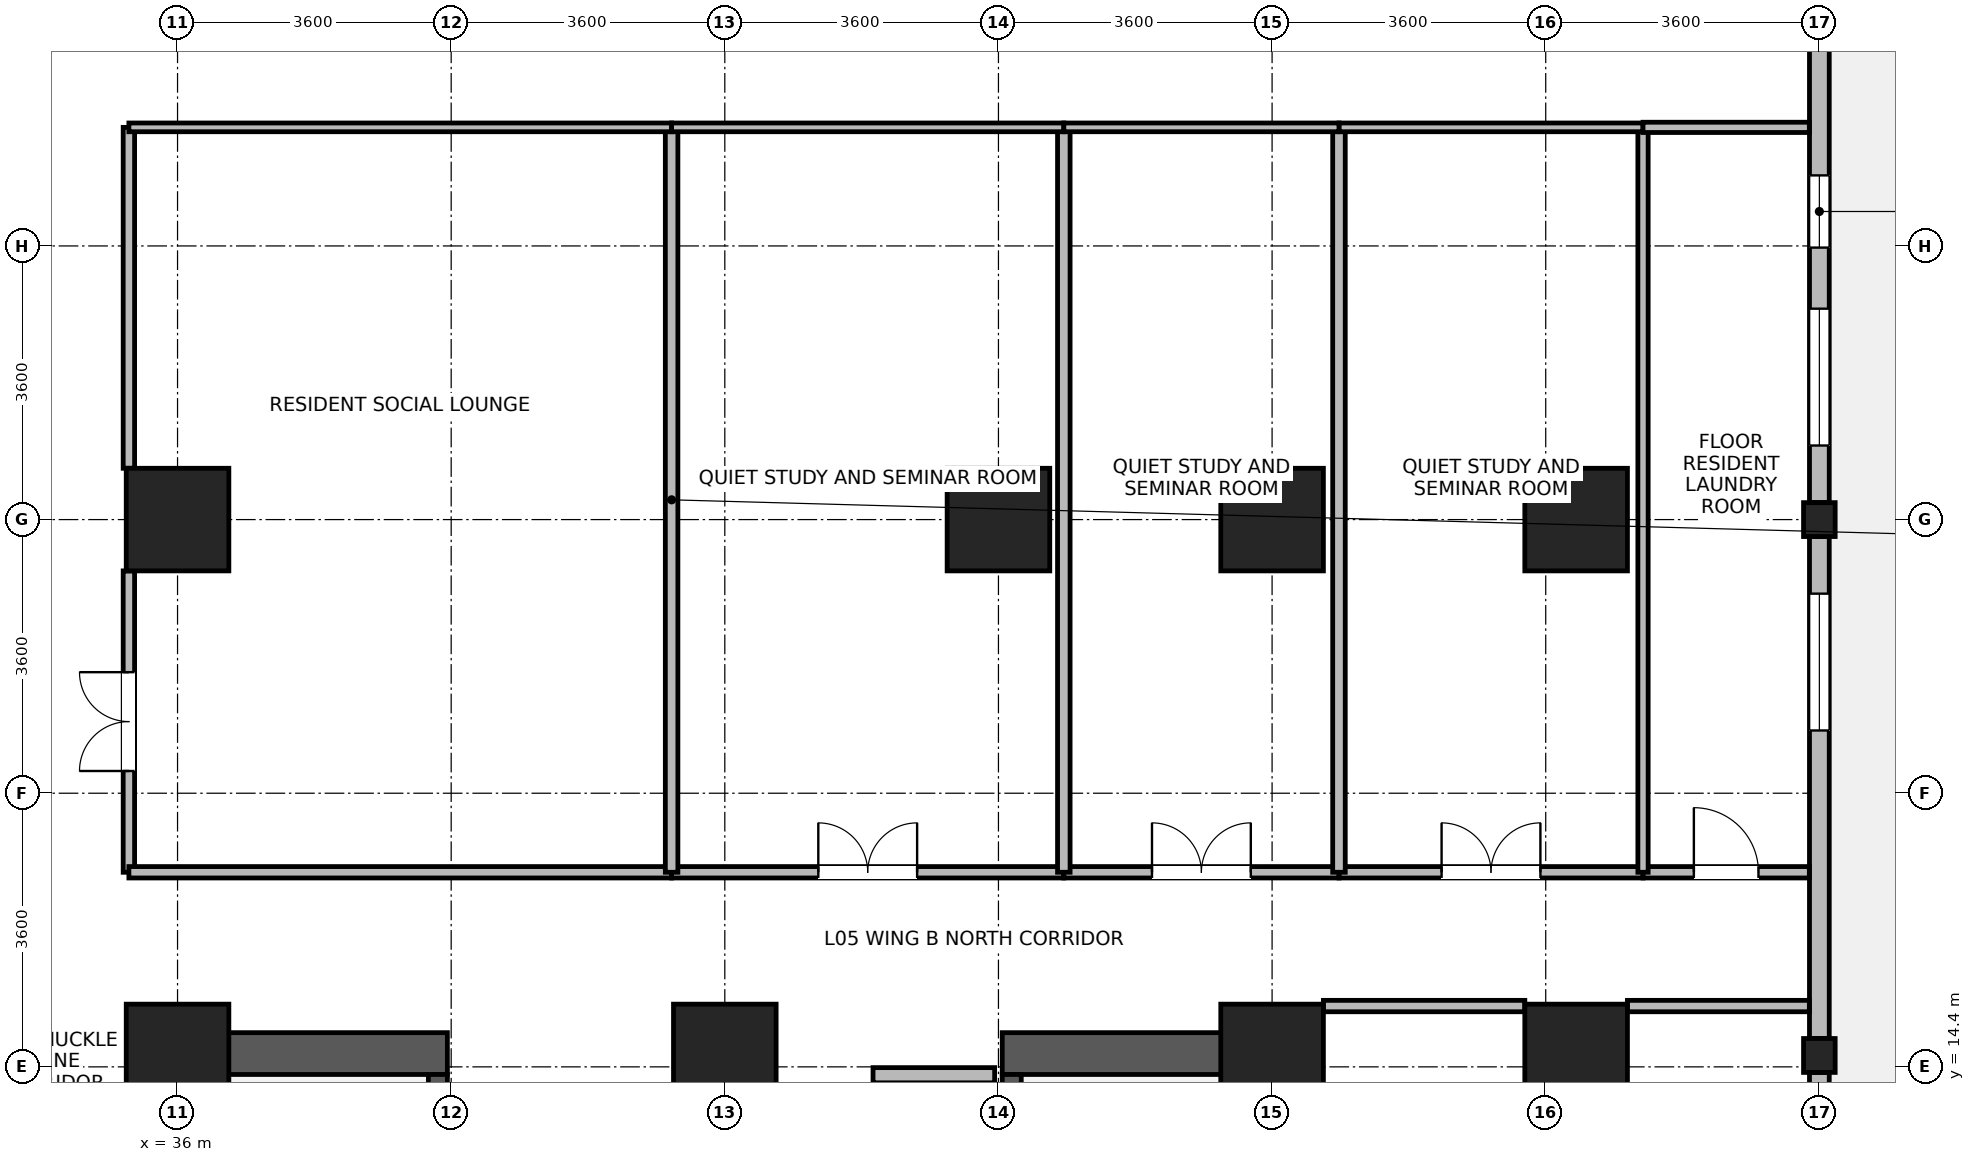
"""IFC4 building model, lengths in metres.
Left out: names, types, materials, properties, quantities, classifications, styles, units other than length and angle.
Written with IfcOpenShell. Run it as: python <this file> out.ifc"""

import sys

from ifc_helpers import new_model, si_unit, direction, frame, frame_2d, origin, origin_2d, place, context, subcontext, project, spatial, rectangle, i_section, extrude, source, transform, mapped, element, fill, save


model = new_model("IFC4")
c1 = context("Model", 3, precision=1e-05, world=origin(), true_north=direction((0.0, 1.0)))
c2 = subcontext(c1, "Body", "Model", "MODEL_VIEW")
j1 = project(units=[si_unit("LENGTHUNIT", "METRE"), si_unit("PLANEANGLEUNIT", "RADIAN")], contexts=[c1])
p1 = place(None, origin())
s1 = spatial("IfcSite", under=j1, at=p1, CompositionType="ELEMENT")
p2 = place(p1, origin())
s2 = spatial("IfcBuilding", under=s1, at=p2, CompositionType="ELEMENT")
p3 = place(p2, frame((0.0, 0.0, 25.3)))
s3 = spatial("IfcBuildingStorey", under=s2, at=p3, CompositionType="ELEMENT", Elevation=25.3)
for number, where, z_axis, x_axis in (
    (1, (36.075, 6.75, 0.0), (0.0, 0.0, 1.0), (0.0, 1.0, 0.0)),
    (2, (50.325, 6.75, 0.0), (0.0, 0.0, 1.0), (0.0, 1.0, 0.0)),
):
    element("IfcWall", number, at=place(p3, frame(where, z_axis=z_axis, x_axis=x_axis)), inside=s3, PredefinedType="SHEAR", context=c2, shape_type="SweptSolid", body=[
        extrude(rectangle(XDim=8.1, YDim=0.55, at=frame_2d((4.05, 0.0))), origin(), (0.0, 0.0, 1.0), 3.45),
    ])
for number, where, z_axis, x_axis in (
    (3, (36.35, 14.575, 0.0), (0.0, 0.0, 1.0), (1.0, 0.0, 0.0)),
    (4, (46.85, 14.575, 0.0), (0.0, 0.0, 1.0), (1.0, 0.0, 0.0)),
):
    element("IfcWall", number, at=place(p3, frame(where, z_axis=z_axis, x_axis=x_axis)), inside=s3, PredefinedType="SHEAR", context=c2, shape_type="SweptSolid", body=[
        extrude(rectangle(XDim=3.2, YDim=0.55, at=frame_2d((1.6, 0.0))), origin(), (0.0, 0.0, 1.0), 3.45),
    ])
p4 = place(p3, frame((39.425, 7.3, 0.0), z_axis=(0.0, 0.0, 1.0), x_axis=(0.0, 1.0, 0.0)))
e5 = element("IfcWall", 5, at=p4, inside=s3, PredefinedType="SHEAR", context=c2, shape_type="SweptSolid", body=[
    extrude(rectangle(XDim=7.0, YDim=0.25, at=frame_2d((3.5, 0.0))), origin(), (0.0, 0.0, 1.0), 3.45),
])
p5 = place(p4, frame((0.15, 0.0, 0.0)))
e6 = element("IfcOpeningElement", 6, at=p5, cuts=e5, PredefinedType="OPENING", context=c2, shape_type="SweptSolid", body=[
    extrude(rectangle(XDim=1.1, YDim=2.08, at=frame_2d((0.55, 1.04))), frame((0.0, 0.135, 0.0), z_axis=(0.0, -1.0, 0.0), x_axis=(1.0, 0.0, 0.0)), (0.0, 0.0, 1.0), 0.27),
])
p6 = place(p3, frame((46.975, 7.3, 0.0), z_axis=(0.0, 0.0, 1.0), x_axis=(0.0, 1.0, 0.0)))
e7 = element("IfcWall", 7, at=p6, inside=s3, PredefinedType="SHEAR", context=c2, shape_type="SweptSolid", body=[
    extrude(rectangle(XDim=7.0, YDim=0.25, at=frame_2d((3.5, 0.0))), origin(), (0.0, 0.0, 1.0), 3.45),
])
p7 = place(p6, frame((0.15, 0.0, 0.0)))
e8 = element("IfcOpeningElement", 8, at=p7, cuts=e7, PredefinedType="OPENING", context=c2, shape_type="SweptSolid", body=[
    extrude(rectangle(XDim=1.1, YDim=2.08, at=frame_2d((0.55, 1.04))), frame((0.0, 0.135, 0.0), z_axis=(0.0, -1.0, 0.0), x_axis=(1.0, 0.0, 0.0)), (0.0, 0.0, 1.0), 0.27),
])
m1 = source(origin(), c2, "Body", "SweptSolid", [
    extrude(rectangle(XDim=1.35, YDim=1.35, at=origin_2d()), origin(), (0.0, 0.0, 1.0), 3.7),
])
for number, where, z_axis, x_axis in (
    (9, (36.0, 21.6, 0.0), (0.0, 0.0, 1.0), (1.0, 0.0, 0.0)),
    (10, (46.8, 21.6, 0.0), (0.0, 0.0, 1.0), (1.0, 0.0, 0.0)),
    (11, (36.0, 14.55, 0.0), (0.0, 0.0, 1.0), (1.0, 0.0, 0.0)),
    (12, (43.2, 14.55, 0.0), (0.0, 0.0, 1.0), (1.0, 0.0, 0.0)),
    (13, (50.4, 14.55, 0.0), (0.0, 0.0, 1.0), (1.0, 0.0, 0.0)),
    (14, (50.4, 21.6, 0.0), (0.0, 0.0, 1.0), (1.0, 0.0, 0.0)),
    (15, (54.4, 14.55, 0.0), (0.0, 0.0, 1.0), (1.0, 0.0, 0.0)),
    (16, (54.4, 21.6, 0.0), (0.0, 0.0, 1.0), (1.0, 0.0, 0.0)),
):
    element("IfcColumn", number, at=place(p3, frame(where, z_axis=z_axis, x_axis=x_axis)), inside=s3, PredefinedType="COLUMN", context=c2, shape_type="MappedRepresentation", body=[
        mapped(m1, transform((0.0, 0.0, 0.0), x_axis=(1.0, 0.0, 0.0), y_axis=(0.0, 1.0, 0.0), z_axis=(0.0, 0.0, 1.0), scale=1.0)),
    ])
m2 = source(origin(), c2, "Body", "SweptSolid", [
    extrude(i_section(OverallWidth=0.416, OverallDepth=0.446, WebThickness=0.029, FlangeThickness=0.04, FilletRadius=0.015, at=origin_2d()), origin(), (0.0, 0.0, 1.0), 3.7),
])
for number, where, z_axis, x_axis in (
    (17, (57.6, 14.55, 0.0), (0.0, 0.0, 1.0), (1.0, 0.0, 0.0)),
    (18, (57.6, 21.6, 0.0), (0.0, 0.0, 1.0), (1.0, 0.0, 0.0)),
):
    element("IfcColumn", number, at=place(p3, frame(where, z_axis=z_axis, x_axis=x_axis)), inside=s3, PredefinedType="COLUMN", context=c2, shape_type="MappedRepresentation", body=[
        mapped(m2, transform((0.0, 0.0, 0.0), x_axis=(1.0, 0.0, 0.0), y_axis=(0.0, 1.0, 0.0), z_axis=(0.0, 0.0, 1.0), scale=1.0)),
    ])
p8 = place(p3, frame((57.6, 14.326, 0.0), z_axis=(0.0, 0.0, 1.0), x_axis=(0.0, -1.0, 0.0)))
e19 = element("IfcWall", 19, at=p8, inside=s3, PredefinedType="STANDARD", context=c2, shape_type="SweptSolid", body=[
    extrude(rectangle(XDim=7.052, YDim=0.26, at=frame_2d((3.526, 0.0))), origin(), (0.0, 0.0, 1.0), 2.93),
])
p9 = place(p8, frame((0.863, 0.0, 0.85)))
e20 = element("IfcOpeningElement", 20, at=p9, cuts=e19, PredefinedType="OPENING", context=c2, shape_type="SweptSolid", body=[
    extrude(rectangle(XDim=1.8, YDim=1.85, at=frame_2d((0.9, 0.925))), frame((0.0, 0.14, 0.0), z_axis=(0.0, -1.0, 0.0), x_axis=(1.0, 0.0, 0.0)), (0.0, 0.0, 1.0), 0.28),
])
p10 = place(p8, frame((4.389, 0.0, 0.85)))
e21 = element("IfcOpeningElement", 21, at=p10, cuts=e19, PredefinedType="OPENING", context=c2, shape_type="SweptSolid", body=[
    extrude(rectangle(XDim=1.8, YDim=1.85, at=frame_2d((0.9, 0.925))), frame((0.0, 0.14, 0.0), z_axis=(0.0, -1.0, 0.0), x_axis=(1.0, 0.0, 0.0)), (0.0, 0.0, 1.0), 0.28),
])
p11 = place(p3, frame((57.6, 21.376, 0.0), z_axis=(0.0, 0.0, 1.0), x_axis=(0.0, -1.0, 0.0)))
e22 = element("IfcWall", 22, at=p11, inside=s3, PredefinedType="STANDARD", context=c2, shape_type="SweptSolid", body=[
    extrude(rectangle(XDim=6.602, YDim=0.26, at=frame_2d((3.301, 0.0))), origin(), (0.0, 0.0, 1.0), 2.93),
])
p12 = place(p11, frame((0.75, 0.0, 0.85)))
e23 = element("IfcOpeningElement", 23, at=p12, cuts=e22, PredefinedType="OPENING", context=c2, shape_type="SweptSolid", body=[
    extrude(rectangle(XDim=1.8, YDim=1.85, at=frame_2d((0.9, 0.925))), frame((0.0, 0.14, 0.0), z_axis=(0.0, -1.0, 0.0), x_axis=(1.0, 0.0, 0.0)), (0.0, 0.0, 1.0), 0.28),
])
p13 = place(p3, frame((57.6, 28.426, 0.0), z_axis=(0.0, 0.0, 1.0), x_axis=(0.0, -1.0, 0.0)))
e24 = element("IfcWall", 24, at=p13, inside=s3, PredefinedType="STANDARD", context=c2, shape_type="SweptSolid", body=[
    extrude(rectangle(XDim=6.602, YDim=0.26, at=frame_2d((3.301, 0.0))), origin(), (0.0, 0.0, 1.0), 2.93),
])
p14 = place(p13, frame((4.052, 0.0, 0.85)))
e25 = element("IfcOpeningElement", 25, at=p14, cuts=e24, PredefinedType="OPENING", context=c2, shape_type="SweptSolid", body=[
    extrude(rectangle(XDim=1.8, YDim=1.85, at=frame_2d((0.9, 0.925))), frame((0.0, 0.14, 0.0), z_axis=(0.0, -1.0, 0.0), x_axis=(1.0, 0.0, 0.0)), (0.0, 0.0, 1.0), 0.28),
])
p15 = place(p13, frame((2.298, 0.0, 0.85)))
e26 = element("IfcOpeningElement", 26, at=p15, cuts=e24, PredefinedType="OPENING", context=c2, shape_type="SweptSolid", body=[
    extrude(rectangle(XDim=0.95, YDim=1.75, at=frame_2d((0.475, 0.875))), frame((0.0, 0.14, 0.0), z_axis=(0.0, -1.0, 0.0), x_axis=(1.0, 0.0, 0.0)), (0.0, 0.0, 1.0), 0.28),
])
p16 = place(p3, frame((45.15, 14.29, 0.0), z_axis=(0.0, 0.0, 1.0), x_axis=(1.0, 0.0, 0.0)))
e27 = element("IfcWall", 27, at=p16, inside=s3, PredefinedType="PARTITIONING", context=c2, shape_type="SweptSolid", body=[
    extrude(rectangle(XDim=1.6, YDim=0.2, at=frame_2d((0.8, 0.0))), origin(), (0.0, 0.0, 1.0), 2.23),
])
p17 = place(p3, frame((35.36, 16.96, 0.0), z_axis=(0.0, 0.0, 1.0), x_axis=(0.0, 1.0, 0.0)))
e28 = element("IfcWall", 28, at=p17, inside=s3, PredefinedType="PARTITIONING", context=c2, shape_type="SweptSolid", body=[
    extrude(rectangle(XDim=3.965, YDim=0.15, at=frame_2d((1.982, 0.0))), origin(), (0.0, 0.0, 1.0), 3.43),
])
p18 = place(p17, frame((1.333, 0.0, 0.0)))
e29 = element("IfcOpeningElement", 29, at=p18, cuts=e28, PredefinedType="OPENING", context=c2, shape_type="SweptSolid", body=[
    extrude(rectangle(XDim=1.3, YDim=2.12, at=frame_2d((0.65, 1.06))), frame((0.0, 0.085, 0.0), z_axis=(0.0, -1.0, 0.0), x_axis=(1.0, 0.0, 0.0)), (0.0, 0.0, 1.0), 0.17),
])
p19 = place(p3, frame((35.36, 22.275, 0.0), z_axis=(0.0, 0.0, 1.0), x_axis=(0.0, 1.0, 0.0)))
e30 = element("IfcWall", 30, at=p19, inside=s3, PredefinedType="PARTITIONING", context=c2, shape_type="SweptSolid", body=[
    extrude(rectangle(XDim=4.485, YDim=0.15, at=frame_2d((2.243, 0.0))), origin(), (0.0, 0.0, 1.0), 3.43),
])
p20 = place(p3, frame((35.36, 16.96, 0.0), z_axis=(0.0, 0.0, 1.0), x_axis=(1.0, 0.0, 0.0)))
e31 = element("IfcWall", 31, at=p20, inside=s3, PredefinedType="PARTITIONING", context=c2, shape_type="SweptSolid", body=[
    extrude(rectangle(XDim=7.14, YDim=0.15, at=frame_2d((3.57, 0.0))), origin(), (0.0, 0.0, 1.0), 3.43),
])
p21 = place(p3, frame((51.075, 15.2, 0.0), z_axis=(0.0, 0.0, 1.0), x_axis=(1.0, 0.0, 0.0)))
e32 = element("IfcWall", 32, at=p21, inside=s3, PredefinedType="PARTITIONING", context=c2, shape_type="SweptSolid", body=[
    extrude(rectangle(XDim=2.65, YDim=0.15, at=frame_2d((1.325, 0.0))), origin(), (0.0, 0.0, 1.0), 3.43),
])
p22 = place(p3, frame((55.075, 15.2, 0.0), z_axis=(0.0, 0.0, 1.0), x_axis=(1.0, 0.0, 0.0)))
e33 = element("IfcWall", 33, at=p22, inside=s3, PredefinedType="PARTITIONING", context=c2, shape_type="SweptSolid", body=[
    extrude(rectangle(XDim=2.393, YDim=0.15, at=frame_2d((1.197, 0.0))), origin(), (0.0, 0.0, 1.0), 3.43),
])
p23 = place(p3, frame((42.5, 16.96, 0.0), z_axis=(0.0, 0.0, 1.0), x_axis=(1.0, 0.0, 0.0)))
e34 = element("IfcWall", 34, at=p23, inside=s3, PredefinedType="PARTITIONING", context=c2, shape_type="SweptSolid", body=[
    extrude(rectangle(XDim=5.16, YDim=0.15, at=frame_2d((2.58, 0.0))), origin(), (0.0, 0.0, 1.0), 3.43),
])
p24 = place(p23, frame((1.93, 0.0, 0.0)))
e35 = element("IfcOpeningElement", 35, at=p24, cuts=e34, PredefinedType="OPENING", context=c2, shape_type="SweptSolid", body=[
    extrude(rectangle(XDim=1.3, YDim=2.12, at=frame_2d((0.65, 1.06))), frame((0.0, 0.085, 0.0), z_axis=(0.0, -1.0, 0.0), x_axis=(1.0, 0.0, 0.0)), (0.0, 0.0, 1.0), 0.17),
])
p25 = place(p3, frame((51.28, 16.96, 0.0), z_axis=(0.0, 0.0, 1.0), x_axis=(1.0, 0.0, 0.0)))
e36 = element("IfcWall", 36, at=p25, inside=s3, PredefinedType="PARTITIONING", context=c2, shape_type="SweptSolid", body=[
    extrude(rectangle(XDim=4.0, YDim=0.15, at=frame_2d((2.0, 0.0))), origin(), (0.0, 0.0, 1.0), 3.43),
])
p26 = place(p25, frame((1.35, 0.0, 0.0)))
e37 = element("IfcOpeningElement", 37, at=p26, cuts=e36, PredefinedType="OPENING", context=c2, shape_type="SweptSolid", body=[
    extrude(rectangle(XDim=1.3, YDim=2.12, at=frame_2d((0.65, 1.06))), frame((0.0, 0.085, 0.0), z_axis=(0.0, -1.0, 0.0), x_axis=(1.0, 0.0, 0.0)), (0.0, 0.0, 1.0), 0.17),
])
p27 = place(p3, frame((47.66, 16.96, 0.0), z_axis=(0.0, 0.0, 1.0), x_axis=(1.0, 0.0, 0.0)))
e38 = element("IfcWall", 38, at=p27, inside=s3, PredefinedType="PARTITIONING", context=c2, shape_type="SweptSolid", body=[
    extrude(rectangle(XDim=3.62, YDim=0.15, at=frame_2d((1.81, 0.0))), origin(), (0.0, 0.0, 1.0), 3.43),
])
p28 = place(p27, frame((1.16, 0.0, 0.0)))
e39 = element("IfcOpeningElement", 39, at=p28, cuts=e38, PredefinedType="OPENING", context=c2, shape_type="SweptSolid", body=[
    extrude(rectangle(XDim=1.3, YDim=2.12, at=frame_2d((0.65, 1.06))), frame((0.0, 0.085, 0.0), z_axis=(0.0, -1.0, 0.0), x_axis=(1.0, 0.0, 0.0)), (0.0, 0.0, 1.0), 0.17),
])
p29 = place(p3, frame((55.28, 16.96, 0.0), z_axis=(0.0, 0.0, 1.0), x_axis=(1.0, 0.0, 0.0)))
e40 = element("IfcWall", 40, at=p29, inside=s3, PredefinedType="PARTITIONING", context=c2, shape_type="SweptSolid", body=[
    extrude(rectangle(XDim=2.188, YDim=0.15, at=frame_2d((1.094, 0.0))), origin(), (0.0, 0.0, 1.0), 3.43),
])
p30 = place(p29, frame((0.669, 0.0, 0.0)))
e41 = element("IfcOpeningElement", 41, at=p30, cuts=e40, PredefinedType="OPENING", context=c2, shape_type="SweptSolid", body=[
    extrude(rectangle(XDim=0.85, YDim=2.04, at=frame_2d((0.425, 1.02))), frame((0.0, 0.085, 0.0), z_axis=(0.0, -1.0, 0.0), x_axis=(1.0, 0.0, 0.0)), (0.0, 0.0, 1.0), 0.17),
])
for number, where, z_axis, x_axis in (
    (42, (42.5, 16.96, 0.0), (0.0, 0.0, 1.0), (0.0, 1.0, 0.0)),
    (43, (47.66, 16.96, 0.0), (0.0, 0.0, 1.0), (0.0, 1.0, 0.0)),
    (44, (51.28, 16.96, 0.0), (0.0, 0.0, 1.0), (0.0, 1.0, 0.0)),
):
    element("IfcWall", number, at=place(p3, frame(where, z_axis=z_axis, x_axis=x_axis)), inside=s3, PredefinedType="PARTITIONING", context=c2, shape_type="SweptSolid", body=[
        extrude(rectangle(XDim=9.8, YDim=0.165, at=frame_2d((4.9, 0.0))), origin(), (0.0, 0.0, 1.0), 3.43),
    ])
p31 = place(p3, frame((55.28, 16.96, 0.0), z_axis=(0.0, 0.0, 1.0), x_axis=(0.0, 1.0, 0.0)))
e45 = element("IfcWall", 45, at=p31, inside=s3, PredefinedType="PARTITIONING", context=c2, shape_type="SweptSolid", body=[
    extrude(rectangle(XDim=9.8, YDim=0.135, at=frame_2d((4.9, 0.0))), origin(), (0.0, 0.0, 1.0), 3.43),
])
p32 = place(p3, frame((35.36, 26.76, 0.0), z_axis=(0.0, 0.0, 1.0), x_axis=(1.0, 0.0, 0.0)))
e46 = element("IfcWall", 46, at=p32, inside=s3, PredefinedType="PARTITIONING", context=c2, shape_type="SweptSolid", body=[
    extrude(rectangle(XDim=7.14, YDim=0.115, at=frame_2d((3.57, 0.0))), origin(), (0.0, 0.0, 1.0), 3.43),
])
p33 = place(p3, frame((42.5, 26.76, 0.0), z_axis=(0.0, 0.0, 1.0), x_axis=(1.0, 0.0, 0.0)))
e47 = element("IfcWall", 47, at=p33, inside=s3, PredefinedType="PARTITIONING", context=c2, shape_type="SweptSolid", body=[
    extrude(rectangle(XDim=5.16, YDim=0.115, at=frame_2d((2.58, 0.0))), origin(), (0.0, 0.0, 1.0), 3.43),
])
p34 = place(p3, frame((51.28, 26.76, 0.0), z_axis=(0.0, 0.0, 1.0), x_axis=(1.0, 0.0, 0.0)))
e48 = element("IfcWall", 48, at=p34, inside=s3, PredefinedType="PARTITIONING", context=c2, shape_type="SweptSolid", body=[
    extrude(rectangle(XDim=4.0, YDim=0.115, at=frame_2d((2.0, 0.0))), origin(), (0.0, 0.0, 1.0), 3.43),
])
p35 = place(p3, frame((47.66, 26.76, 0.0), z_axis=(0.0, 0.0, 1.0), x_axis=(1.0, 0.0, 0.0)))
e49 = element("IfcWall", 49, at=p35, inside=s3, PredefinedType="PARTITIONING", context=c2, shape_type="SweptSolid", body=[
    extrude(rectangle(XDim=3.62, YDim=0.115, at=frame_2d((1.81, 0.0))), origin(), (0.0, 0.0, 1.0), 3.43),
])
p36 = place(p3, frame((55.28, 26.76, 0.0), z_axis=(0.0, 0.0, 1.0), x_axis=(1.0, 0.0, 0.0)))
e50 = element("IfcWall", 50, at=p36, inside=s3, PredefinedType="PARTITIONING", context=c2, shape_type="SweptSolid", body=[
    extrude(rectangle(XDim=2.188, YDim=0.135, at=frame_2d((1.094, 0.0))), origin(), (0.0, 0.0, 1.0), 3.43),
])
p37 = place(p12, origin())
e51 = element("IfcWindow", 51, at=p37, inside=s3, PartitioningType="SINGLE_PANEL", PredefinedType="WINDOW", context=c2, shape_type="SweptSolid", body=[
    extrude(rectangle(XDim=1.8, YDim=1.85, at=frame_2d((0.9, 0.925))), frame((0.0, 0.03, 0.0), z_axis=(0.0, -1.0, 0.0), x_axis=(1.0, 0.0, 0.0)), (0.0, 0.0, 1.0), 0.06),
])
fill(e23, e51)
p38 = place(p14, origin())
e52 = element("IfcWindow", 52, at=p38, inside=s3, PartitioningType="SINGLE_PANEL", PredefinedType="WINDOW", context=c2, shape_type="SweptSolid", body=[
    extrude(rectangle(XDim=1.8, YDim=1.85, at=frame_2d((0.9, 0.925))), frame((0.0, 0.03, 0.0), z_axis=(0.0, -1.0, 0.0), x_axis=(1.0, 0.0, 0.0)), (0.0, 0.0, 1.0), 0.06),
])
fill(e25, e52)
p39 = place(p15, origin())
e53 = element("IfcWindow", 53, at=p39, inside=s3, PartitioningType="SINGLE_PANEL", PredefinedType="WINDOW", context=c2, shape_type="SweptSolid", body=[
    extrude(rectangle(XDim=0.95, YDim=1.75, at=frame_2d((0.475, 0.875))), frame((0.0, 0.03, 0.0), z_axis=(0.0, -1.0, 0.0), x_axis=(1.0, 0.0, 0.0)), (0.0, 0.0, 1.0), 0.06),
])
fill(e26, e53)
p40 = place(p18, origin())
e54 = element("IfcDoor", 54, at=p40, inside=s3, OperationType="DOUBLE_DOOR_SINGLE_SWING", PredefinedType="DOOR", context=c2, shape_type="SweptSolid", body=[
    extrude(rectangle(XDim=1.3, YDim=2.12, at=frame_2d((0.65, 1.06))), frame((0.0, 0.025, 0.0), z_axis=(0.0, -1.0, 0.0), x_axis=(1.0, 0.0, 0.0)), (0.0, 0.0, 1.0), 0.05),
])
fill(e29, e54)
p41 = place(p24, origin())
e55 = element("IfcDoor", 55, at=p41, inside=s3, OperationType="DOUBLE_DOOR_SINGLE_SWING", PredefinedType="DOOR", context=c2, shape_type="SweptSolid", body=[
    extrude(rectangle(XDim=1.3, YDim=2.12, at=frame_2d((0.65, 1.06))), frame((0.0, 0.025, 0.0), z_axis=(0.0, -1.0, 0.0), x_axis=(1.0, 0.0, 0.0)), (0.0, 0.0, 1.0), 0.05),
])
fill(e35, e55)
p42 = place(p26, origin())
e56 = element("IfcDoor", 56, at=p42, inside=s3, OperationType="DOUBLE_DOOR_SINGLE_SWING", PredefinedType="DOOR", context=c2, shape_type="SweptSolid", body=[
    extrude(rectangle(XDim=1.3, YDim=2.12, at=frame_2d((0.65, 1.06))), frame((0.0, 0.025, 0.0), z_axis=(0.0, -1.0, 0.0), x_axis=(1.0, 0.0, 0.0)), (0.0, 0.0, 1.0), 0.05),
])
fill(e37, e56)
p43 = place(p28, origin())
e57 = element("IfcDoor", 57, at=p43, inside=s3, OperationType="DOUBLE_DOOR_SINGLE_SWING", PredefinedType="DOOR", context=c2, shape_type="SweptSolid", body=[
    extrude(rectangle(XDim=1.3, YDim=2.12, at=frame_2d((0.65, 1.06))), frame((0.0, 0.025, 0.0), z_axis=(0.0, -1.0, 0.0), x_axis=(1.0, 0.0, 0.0)), (0.0, 0.0, 1.0), 0.05),
])
fill(e39, e57)
p44 = place(p30, origin())
e58 = element("IfcDoor", 58, at=p44, inside=s3, OperationType="SINGLE_SWING_LEFT", PredefinedType="DOOR", context=c2, shape_type="SweptSolid", body=[
    extrude(rectangle(XDim=0.85, YDim=2.04, at=frame_2d((0.425, 1.02))), frame((0.0, 0.025, 0.0), z_axis=(0.0, -1.0, 0.0), x_axis=(1.0, 0.0, 0.0)), (0.0, 0.0, 1.0), 0.05),
])
fill(e41, e58)
save(model, sys.argv[1])
